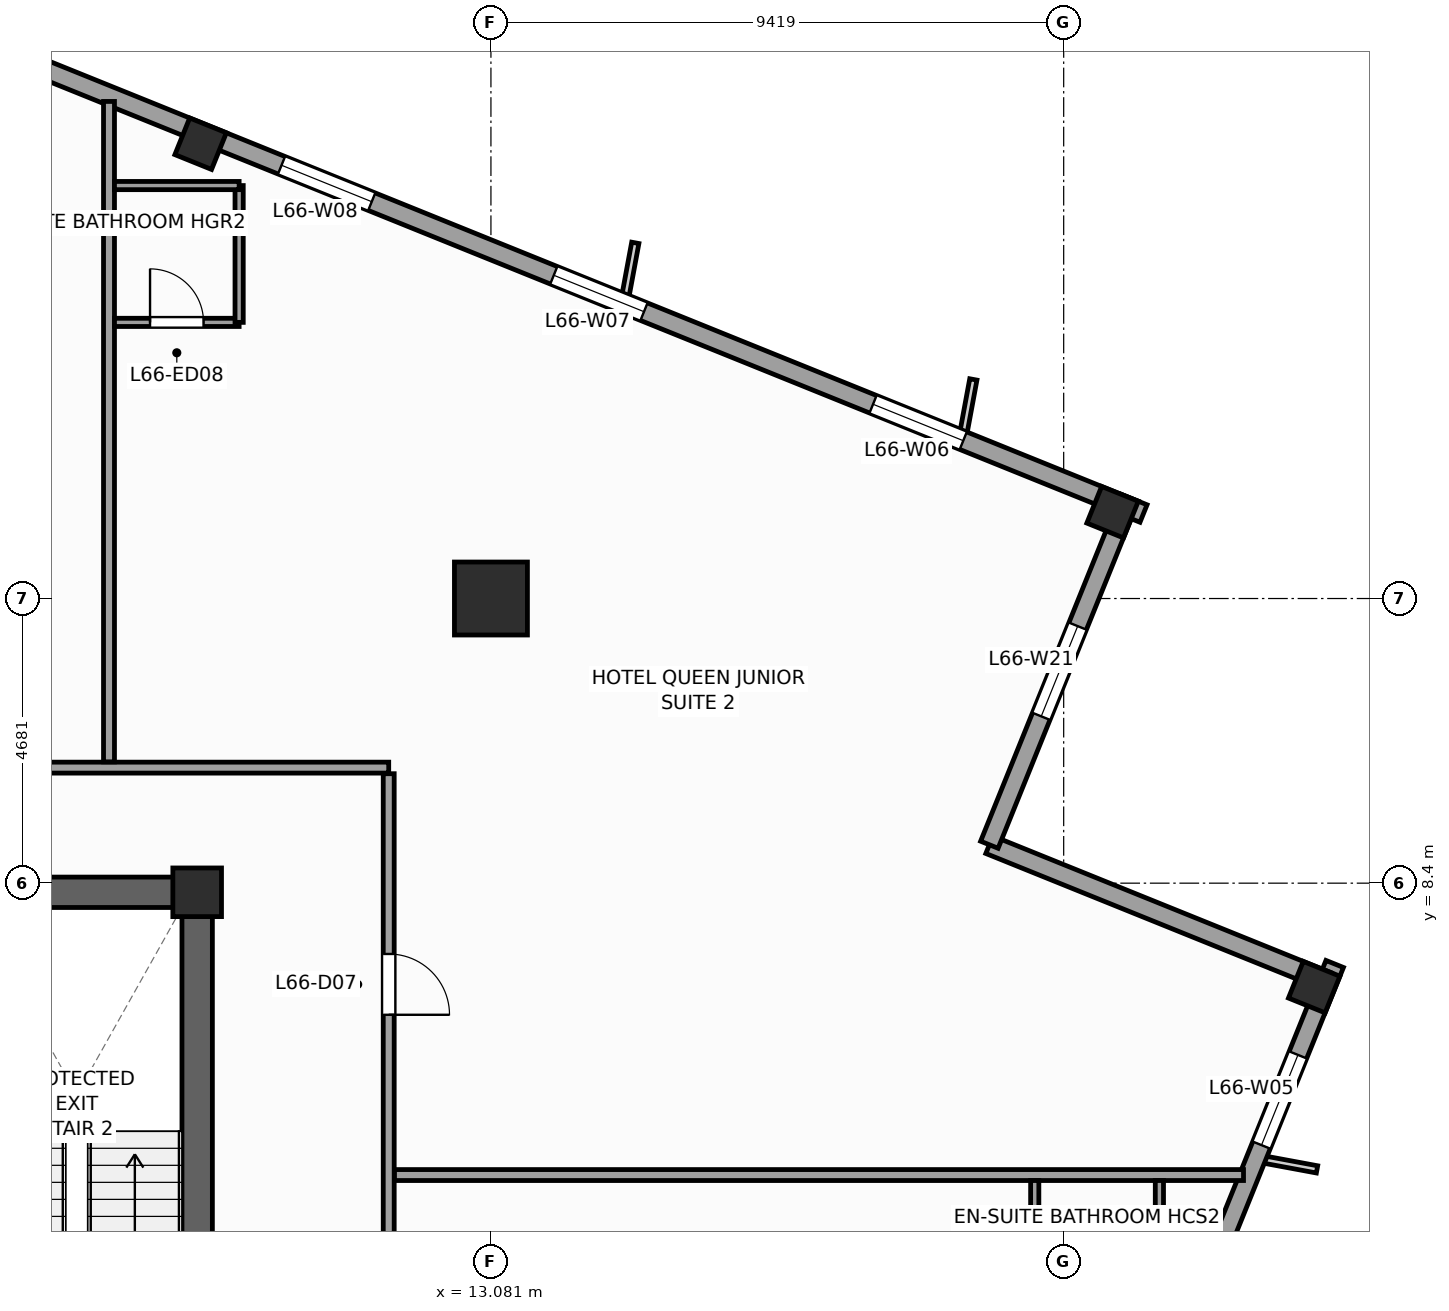
"""IFC4 building model, lengths in metres.
Left out: names, types, materials, properties, quantities, classifications, styles, units other than length and angle.
Written with IfcOpenShell. Run it as: python <this file> out.ifc"""

import sys

from ifc_helpers import new_model, si_unit, direction, frame, frame_2d, origin, origin_2d, place, context, subcontext, project, spatial, rectangle, extrude, source, transform, mapped, element, fill, save


model = new_model("IFC4")
c1 = context("Model", 3, precision=1e-05, world=origin(), true_north=direction((0.0, 1.0)))
c2 = subcontext(c1, "Body", "Model", "MODEL_VIEW")
j1 = project(units=[si_unit("LENGTHUNIT", "METRE"), si_unit("PLANEANGLEUNIT", "RADIAN")], contexts=[c1])
p1 = place(None, origin())
s1 = spatial("IfcSite", under=j1, at=p1, CompositionType="ELEMENT")
p2 = place(p1, origin())
s2 = spatial("IfcBuilding", under=s1, at=p2, CompositionType="ELEMENT")
p3 = place(p2, frame((0.0, 0.0, 272.4)))
s3 = spatial("IfcBuildingStorey", under=s2, at=p3, CompositionType="ELEMENT", Elevation=272.4)
p4 = place(p3, frame((-8.5, 8.25, 0.0), z_axis=(0.0, 0.0, 1.0), x_axis=(1.0, 0.0, 0.0)))
e1 = element("IfcWall", 1, at=p4, inside=s3, PredefinedType="SHEAR", context=c2, shape_type="SweptSolid", body=[
    extrude(rectangle(XDim=17.0, YDim=0.5, at=frame_2d((8.5, 0.0))), origin(), (0.0, 0.0, 1.0), 3.6),
])
p5 = place(p3, frame((8.25, -8.0, 0.0), z_axis=(0.0, 0.0, 1.0), x_axis=(0.0, 1.0, 0.0)))
e2 = element("IfcWall", 2, at=p5, inside=s3, PredefinedType="SHEAR", context=c2, shape_type="SweptSolid", body=[
    extrude(rectangle(XDim=16.0, YDim=0.5, at=frame_2d((8.0, 0.0))), origin(), (0.0, 0.0, 1.0), 3.6),
])
p6 = place(p5, frame((4.69, 0.0, 0.0)))
e3 = element("IfcOpeningElement", 3, at=p6, cuts=e2, PredefinedType="OPENING", context=c2, shape_type="SweptSolid", body=[
    extrude(rectangle(XDim=1.3, YDim=2.2, at=frame_2d((0.65, 1.1))), frame((0.0, 0.26, 0.0), z_axis=(0.0, -1.0, 0.0), x_axis=(1.0, 0.0, 0.0)), (0.0, 0.0, 1.0), 0.52),
])
m1 = source(origin(), c2, "Body", "SweptSolid", [
    extrude(rectangle(XDim=0.8, YDim=0.8, at=origin_2d()), origin(), (0.0, 0.0, 1.0), 3.6),
])
p7 = place(p3, frame((8.25, 8.25, 0.0), z_axis=(0.0, 0.0, 1.0), x_axis=(1.0, 0.0, 0.0)))
e4 = element("IfcColumn", 4, at=p7, inside=s3, PredefinedType="PILASTER", context=c2, shape_type="MappedRepresentation", body=[
    mapped(m1, transform((0.0, 0.0, 0.0), scale=1.0)),
])
m2 = source(origin(), c2, "Body", "SweptSolid", [
    extrude(rectangle(XDim=1.2, YDim=1.2, at=origin_2d()), origin(), (0.0, 0.0, 1.0), 3.6),
])
p8 = place(p3, frame((13.081, 13.081, 0.0), z_axis=(0.0, 0.0, 1.0), x_axis=(1.0, 0.0, 0.0)))
e5 = element("IfcColumn", 5, at=p8, inside=s3, PredefinedType="COLUMN", context=c2, shape_type="MappedRepresentation", body=[
    mapped(m2, transform((0.0, 0.0, 0.0), scale=1.0)),
])
m3 = source(origin(), c2, "Body", "SweptSolid", [
    extrude(rectangle(XDim=0.65, YDim=0.65, at=origin_2d()), origin(), (0.0, 0.0, 1.0), 3.6),
])
for number, where, z_axis, x_axis in (
    (6, (26.62, 6.69, 0.0), (0.0, 0.0, 1.0), (0.375, 0.927, 0.0)),
    (7, (23.304, 14.501, 0.0), (0.0, 0.0, 1.0), (0.375, 0.927, 0.0)),
    (8, (8.307, 20.56, 0.0), (0.0, 0.0, 1.0), (0.375, 0.927, 0.0)),
):
    element("IfcColumn", number, at=place(p3, frame(where, z_axis=z_axis, x_axis=x_axis)), inside=s3, PredefinedType="COLUMN", context=c2, shape_type="MappedRepresentation", body=[
        mapped(m3, transform((0.0, 0.0, 0.0), scale=1.0)),
    ])
p9 = place(p3, frame((14.479, -23.813, 0.0), z_axis=(0.0, 0.0, 1.0), x_axis=(0.374609557019, 0.927182657188, 0.0)))
e9 = element("IfcWall", 9, at=p9, inside=s3, PredefinedType="STANDARD", context=c2, shape_type="SweptSolid", body=[
    extrude(rectangle(XDim=33.31, YDim=0.31, at=frame_2d((16.655, 0.0))), origin(), (0.0, 0.0, 1.0), 2.75),
])
p10 = place(p9, frame((10.53, 0.0, 0.0)))
e10 = element("IfcOpeningElement", 10, at=p10, cuts=e9, PredefinedType="OPENING", context=c2, shape_type="SweptSolid", body=[
    extrude(rectangle(XDim=1.05, YDim=2.25, at=frame_2d((0.525, 1.125))), frame((0.0, 0.165, 0.0), z_axis=(0.0, -1.0, 0.0), x_axis=(1.0, 0.0, 0.0)), (0.0, 0.0, 1.0), 0.33),
])
p11 = place(p9, frame((3.197, 0.0, 0.47)))
e11 = element("IfcOpeningElement", 11, at=p11, cuts=e9, PredefinedType="OPENING", context=c2, shape_type="SweptSolid", body=[
    extrude(rectangle(XDim=1.6, YDim=2.1, at=frame_2d((0.8, 1.05))), frame((0.0, 0.165, 0.0), z_axis=(0.0, -1.0, 0.0), x_axis=(1.0, 0.0, 0.0)), (0.0, 0.0, 1.0), 0.33),
])
p12 = place(p9, frame((7.36, 0.0, 0.47)))
e12 = element("IfcOpeningElement", 12, at=p12, cuts=e9, PredefinedType="OPENING", context=c2, shape_type="SweptSolid", body=[
    extrude(rectangle(XDim=1.6, YDim=2.1, at=frame_2d((0.8, 1.05))), frame((0.0, 0.165, 0.0), z_axis=(0.0, -1.0, 0.0), x_axis=(1.0, 0.0, 0.0)), (0.0, 0.0, 1.0), 0.33),
])
p13 = place(p9, frame((14.439, 0.0, 0.47)))
e13 = element("IfcOpeningElement", 13, at=p13, cuts=e9, PredefinedType="OPENING", context=c2, shape_type="SweptSolid", body=[
    extrude(rectangle(XDim=1.6, YDim=2.1, at=frame_2d((0.8, 1.05))), frame((0.0, 0.165, 0.0), z_axis=(0.0, -1.0, 0.0), x_axis=(1.0, 0.0, 0.0)), (0.0, 0.0, 1.0), 0.33),
])
p14 = place(p9, frame((22.601, 0.0, 0.47)))
e14 = element("IfcOpeningElement", 14, at=p14, cuts=e9, PredefinedType="OPENING", context=c2, shape_type="SweptSolid", body=[
    extrude(rectangle(XDim=1.6, YDim=2.1, at=frame_2d((0.8, 1.05))), frame((0.0, 0.165, 0.0), z_axis=(0.0, -1.0, 0.0), x_axis=(1.0, 0.0, 0.0)), (0.0, 0.0, 1.0), 0.33),
])
p15 = place(p9, frame((30.097, 0.0, 0.47)))
e15 = element("IfcOpeningElement", 15, at=p15, cuts=e9, PredefinedType="OPENING", context=c2, shape_type="SweptSolid", body=[
    extrude(rectangle(XDim=1.6, YDim=2.1, at=frame_2d((0.8, 1.05))), frame((0.0, 0.165, 0.0), z_axis=(0.0, -1.0, 0.0), x_axis=(1.0, 0.0, 0.0)), (0.0, 0.0, 1.0), 0.33),
])
p16 = place(p3, frame((26.841, 6.784, 0.0), z_axis=(0.0, 0.0, 1.0), x_axis=(-0.927171722085, 0.374636620962, 0.0)))
e16 = element("IfcWall", 16, at=p16, inside=s3, PredefinedType="STANDARD", context=c2, shape_type="SweptSolid", body=[
    extrude(rectangle(XDim=6.0, YDim=0.31, at=frame_2d((3.0, 0.0))), origin(), (0.0, 0.0, 1.0), 2.65),
])
p17 = place(p3, frame((21.278, 9.032, 0.0), z_axis=(0.0, 0.0, 1.0), x_axis=(0.374602739196, 0.927185411764, 0.0)))
e17 = element("IfcWall", 17, at=p17, inside=s3, PredefinedType="STANDARD", context=c2, shape_type="SweptSolid", body=[
    extrude(rectangle(XDim=6.155, YDim=0.31, at=frame_2d((3.078, 0.0))), origin(), (0.0, 0.0, 1.0), 3.35),
])
p18 = place(p17, frame((2.278, 0.0, 0.47)))
e18 = element("IfcOpeningElement", 18, at=p18, cuts=e17, PredefinedType="OPENING", context=c2, shape_type="SweptSolid", body=[
    extrude(rectangle(XDim=1.6, YDim=2.1, at=frame_2d((0.8, 1.05))), frame((0.0, 0.165, 0.0), z_axis=(0.0, -1.0, 0.0), x_axis=(1.0, 0.0, 0.0)), (0.0, 0.0, 1.0), 0.33),
])
p19 = place(p3, frame((23.813, 14.479, 0.0), z_axis=(0.0, 0.0, 1.0), x_axis=(-0.927182657188, 0.374609557019, 0.0)))
e19 = element("IfcWall", 19, at=p19, inside=s3, PredefinedType="STANDARD", context=c2, shape_type="SweptSolid", body=[
    extrude(rectangle(XDim=33.31, YDim=0.31, at=frame_2d((16.655, 0.0))), origin(), (0.0, 0.0, 1.0), 2.75),
])
p20 = place(p19, frame((3.197, 0.0, 0.47)))
e20 = element("IfcOpeningElement", 20, at=p20, cuts=e19, PredefinedType="OPENING", context=c2, shape_type="SweptSolid", body=[
    extrude(rectangle(XDim=1.6, YDim=2.1, at=frame_2d((0.8, 1.05))), frame((0.0, 0.165, 0.0), z_axis=(0.0, -1.0, 0.0), x_axis=(1.0, 0.0, 0.0)), (0.0, 0.0, 1.0), 0.33),
])
p21 = place(p19, frame((8.86, 0.0, 0.47)))
e21 = element("IfcOpeningElement", 21, at=p21, cuts=e19, PredefinedType="OPENING", context=c2, shape_type="SweptSolid", body=[
    extrude(rectangle(XDim=1.6, YDim=2.1, at=frame_2d((0.8, 1.05))), frame((0.0, 0.165, 0.0), z_axis=(0.0, -1.0, 0.0), x_axis=(1.0, 0.0, 0.0)), (0.0, 0.0, 1.0), 0.33),
])
p22 = place(p19, frame((13.689, 0.0, 0.47)))
e22 = element("IfcOpeningElement", 22, at=p22, cuts=e19, PredefinedType="OPENING", context=c2, shape_type="SweptSolid", body=[
    extrude(rectangle(XDim=1.6, YDim=2.1, at=frame_2d((0.8, 1.05))), frame((0.0, 0.165, 0.0), z_axis=(0.0, -1.0, 0.0), x_axis=(1.0, 0.0, 0.0)), (0.0, 0.0, 1.0), 0.33),
])
p23 = place(p19, frame((21.851, 0.0, 0.47)))
e23 = element("IfcOpeningElement", 23, at=p23, cuts=e19, PredefinedType="OPENING", context=c2, shape_type="SweptSolid", body=[
    extrude(rectangle(XDim=1.6, YDim=2.1, at=frame_2d((0.8, 1.05))), frame((0.0, 0.165, 0.0), z_axis=(0.0, -1.0, 0.0), x_axis=(1.0, 0.0, 0.0)), (0.0, 0.0, 1.0), 0.33),
])
p24 = place(p19, frame((27.847, 0.0, 0.47)))
e24 = element("IfcOpeningElement", 24, at=p24, cuts=e19, PredefinedType="OPENING", context=c2, shape_type="SweptSolid", body=[
    extrude(rectangle(XDim=1.6, YDim=2.1, at=frame_2d((0.8, 1.05))), frame((0.0, 0.165, 0.0), z_axis=(0.0, -1.0, 0.0), x_axis=(1.0, 0.0, 0.0)), (0.0, 0.0, 1.0), 0.33),
])
p25 = place(p3, frame((-10.3, 10.3, 0.0), z_axis=(0.0, 0.0, 1.0), x_axis=(1.0, 0.0, 0.0)))
e25 = element("IfcWall", 25, at=p25, inside=s3, PredefinedType="PARTITIONING", context=c2, shape_type="SweptSolid", body=[
    extrude(rectangle(XDim=21.7, YDim=0.18, at=frame_2d((10.85, 0.0))), origin(), (0.0, 0.0, 1.0), 3.35),
])
p26 = place(p25, frame((9.8, 0.0, 0.0)))
e26 = element("IfcOpeningElement", 26, at=p26, cuts=e25, PredefinedType="OPENING", context=c2, shape_type="SweptSolid", body=[
    extrude(rectangle(XDim=1.0, YDim=2.15, at=frame_2d((0.5, 1.075))), frame((0.0, 0.1, 0.0), z_axis=(0.0, -1.0, 0.0), x_axis=(1.0, 0.0, 0.0)), (0.0, 0.0, 1.0), 0.2),
])
p27 = place(p3, frame((11.4, -11.3, 0.0), z_axis=(0.0, 0.0, 1.0), x_axis=(0.0, 1.0, 0.0)))
e27 = element("IfcWall", 27, at=p27, inside=s3, PredefinedType="PARTITIONING", context=c2, shape_type="SweptSolid", body=[
    extrude(rectangle(XDim=21.5, YDim=0.18, at=frame_2d((10.75, 0.0))), origin(), (0.0, 0.0, 1.0), 3.35),
])
p28 = place(p27, frame((17.536, 0.0, 0.0)))
e28 = element("IfcOpeningElement", 28, at=p28, cuts=e27, PredefinedType="OPENING", context=c2, shape_type="SweptSolid", body=[
    extrude(rectangle(XDim=1.0, YDim=2.15, at=frame_2d((0.5, 1.075))), frame((0.0, 0.1, 0.0), z_axis=(0.0, -1.0, 0.0), x_axis=(1.0, 0.0, 0.0)), (0.0, 0.0, 1.0), 0.2),
])
p29 = place(p27, frame((10.8, 0.0, 0.0)))
e29 = element("IfcOpeningElement", 29, at=p29, cuts=e27, PredefinedType="OPENING", context=c2, shape_type="SweptSolid", body=[
    extrude(rectangle(XDim=1.0, YDim=2.15, at=frame_2d((0.5, 1.075))), frame((0.0, 0.1, 0.0), z_axis=(0.0, -1.0, 0.0), x_axis=(1.0, 0.0, 0.0)), (0.0, 0.0, 1.0), 0.2),
])
p30 = place(p27, frame((5.4, 0.0, 0.0)))
e30 = element("IfcOpeningElement", 30, at=p30, cuts=e27, PredefinedType="OPENING", context=c2, shape_type="SweptSolid", body=[
    extrude(rectangle(XDim=1.0, YDim=2.15, at=frame_2d((0.5, 1.075))), frame((0.0, 0.1, 0.0), z_axis=(0.0, -1.0, 0.0), x_axis=(1.0, 0.0, 0.0)), (0.0, 0.0, 1.0), 0.2),
])
p31 = place(p3, frame((6.8, 10.395, 0.0), z_axis=(0.0, 0.0, 1.0), x_axis=(0.0, 1.0, 0.0)))
e31 = element("IfcWall", 31, at=p31, inside=s3, PredefinedType="PARTITIONING", context=c2, shape_type="SweptSolid", body=[
    extrude(rectangle(XDim=10.86, YDim=0.18, at=frame_2d((5.43, 0.0))), origin(), (0.0, 0.0, 1.0), 3.35),
])
p32 = place(p3, frame((11.495, 3.6, 0.0), z_axis=(0.0, 0.0, 1.0), x_axis=(1.0, 0.0, 0.0)))
e32 = element("IfcWall", 32, at=p32, inside=s3, PredefinedType="PARTITIONING", context=c2, shape_type="SweptSolid", body=[
    extrude(rectangle(XDim=13.962, YDim=0.18, at=frame_2d((6.981, 0.0))), origin(), (0.0, 0.0, 1.0), 3.35),
])
p33 = place(p3, frame((6.89, 17.622, 0.0), z_axis=(0.0, 0.0, 1.0), x_axis=(1.0, 0.0, 0.0)))
e33 = element("IfcWall", 33, at=p33, inside=s3, PredefinedType="PARTITIONING", context=c2, shape_type="SweptSolid", body=[
    extrude(rectangle(XDim=2.05, YDim=0.135, at=frame_2d((1.025, 0.0))), origin(), (0.0, 0.0, 1.0), 2.95),
])
p34 = place(p33, frame((0.585, 0.0, 0.0)))
e34 = element("IfcOpeningElement", 34, at=p34, cuts=e33, PredefinedType="OPENING", context=c2, shape_type="SweptSolid", body=[
    extrude(rectangle(XDim=0.88, YDim=2.1, at=frame_2d((0.44, 1.05))), frame((0.0, 0.078, 0.0), z_axis=(0.0, -1.0, 0.0), x_axis=(1.0, 0.0, 0.0)), (0.0, 0.0, 1.0), 0.155),
])
p35 = place(p3, frame((8.94, 17.622, 0.0), z_axis=(0.0, 0.0, 1.0), x_axis=(0.0, 1.0, 0.0)))
e35 = element("IfcWall", 35, at=p35, inside=s3, PredefinedType="PARTITIONING", context=c2, shape_type="SweptSolid", body=[
    extrude(rectangle(XDim=2.25, YDim=0.135, at=frame_2d((1.125, 0.0))), origin(), (0.0, 0.0, 1.0), 3.35),
])
p36 = place(p3, frame((6.89, 19.872, 0.0), z_axis=(0.0, 0.0, 1.0), x_axis=(1.0, 0.0, 0.0)))
e36 = element("IfcWall", 36, at=p36, inside=s3, PredefinedType="PARTITIONING", context=c2, shape_type="SweptSolid", body=[
    extrude(rectangle(XDim=2.05, YDim=0.135, at=frame_2d((1.025, 0.0))), origin(), (0.0, 0.0, 1.0), 3.35),
])
for number, where, z_axis, x_axis in (
    (37, (24.074, 1.26, 0.0), (0.0, 0.0, 1.0), (0.0, 1.0, 0.0)),
    (38, (22.024, 1.26, 0.0), (0.0, 0.0, 1.0), (0.0, 1.0, 0.0)),
):
    element("IfcWall", number, at=place(p3, frame(where, z_axis=z_axis, x_axis=x_axis)), inside=s3, PredefinedType="PARTITIONING", context=c2, shape_type="SweptSolid", body=[
        extrude(rectangle(XDim=2.25, YDim=0.135, at=frame_2d((1.125, 0.0))), origin(), (0.0, 0.0, 1.0), 3.35),
    ])
m4 = source(origin(), c2, "Body", "SweptSolid", [
    extrude(rectangle(XDim=1.6, YDim=2.1, at=frame_2d((0.8, 1.05))), frame((0.0, 0.03, 0.0), z_axis=(0.0, -1.0, 0.0), x_axis=(1.0, 0.0, 0.0)), (0.0, 0.0, 1.0), 0.06),
])
p37 = place(p15, origin())
e39 = element("IfcWindow", 39, at=p37, inside=s3, PartitioningType="SINGLE_PANEL", PredefinedType="WINDOW", context=c2, shape_type="MappedRepresentation", body=[
    mapped(m4, transform((0.0, 0.0, 0.0), scale=1.0)),
])
fill(e15, e39)
p38 = place(p20, origin())
e40 = element("IfcWindow", 40, at=p38, inside=s3, PartitioningType="SINGLE_PANEL", PredefinedType="WINDOW", context=c2, shape_type="MappedRepresentation", body=[
    mapped(m4, transform((0.0, 0.0, 0.0), scale=1.0)),
])
fill(e20, e40)
p39 = place(p21, origin())
e41 = element("IfcWindow", 41, at=p39, inside=s3, PartitioningType="SINGLE_PANEL", PredefinedType="WINDOW", context=c2, shape_type="MappedRepresentation", body=[
    mapped(m4, transform((0.0, 0.0, 0.0), scale=1.0)),
])
fill(e21, e41)
p40 = place(p22, origin())
e42 = element("IfcWindow", 42, at=p40, inside=s3, PartitioningType="SINGLE_PANEL", PredefinedType="WINDOW", context=c2, shape_type="MappedRepresentation", body=[
    mapped(m4, transform((0.0, 0.0, 0.0), scale=1.0)),
])
fill(e22, e42)
p41 = place(p18, origin())
e43 = element("IfcWindow", 43, at=p41, inside=s3, PartitioningType="SINGLE_PANEL", PredefinedType="WINDOW", context=c2, shape_type="MappedRepresentation", body=[
    mapped(m4, transform((0.0, 0.0, 0.0), scale=1.0)),
])
fill(e18, e43)
m5 = source(origin(), c2, "Body", "SweptSolid", [
    extrude(rectangle(XDim=1.0, YDim=2.15, at=frame_2d((0.5, 1.075))), frame((0.0, 0.025, 0.0), z_axis=(0.0, -1.0, 0.0), x_axis=(1.0, 0.0, 0.0)), (0.0, 0.0, 1.0), 0.05),
])
p42 = place(p28, frame((1.0, 0.0, 0.0), z_axis=(0.0, 0.0, 1.0), x_axis=(-1.0, 0.0, 0.0)))
e44 = element("IfcDoor", 44, at=p42, inside=s3, OperationType="SINGLE_SWING_LEFT", PredefinedType="DOOR", context=c2, shape_type="MappedRepresentation", body=[
    mapped(m5, transform((0.0, 0.0, 0.0), scale=1.0)),
])
fill(e28, e44)
m6 = source(origin(), c2, "Body", "SweptSolid", [
    extrude(rectangle(XDim=0.88, YDim=2.1, at=frame_2d((0.44, 1.05))), frame((0.0, 0.025, 0.0), z_axis=(0.0, -1.0, 0.0), x_axis=(1.0, 0.0, 0.0)), (0.0, 0.0, 1.0), 0.05),
])
p43 = place(p34, origin())
e45 = element("IfcDoor", 45, at=p43, inside=s3, OperationType="SINGLE_SWING_LEFT", PredefinedType="DOOR", context=c2, shape_type="MappedRepresentation", body=[
    mapped(m6, transform((0.0, 0.0, 0.0), scale=1.0)),
])
fill(e34, e45)
save(model, sys.argv[1])
